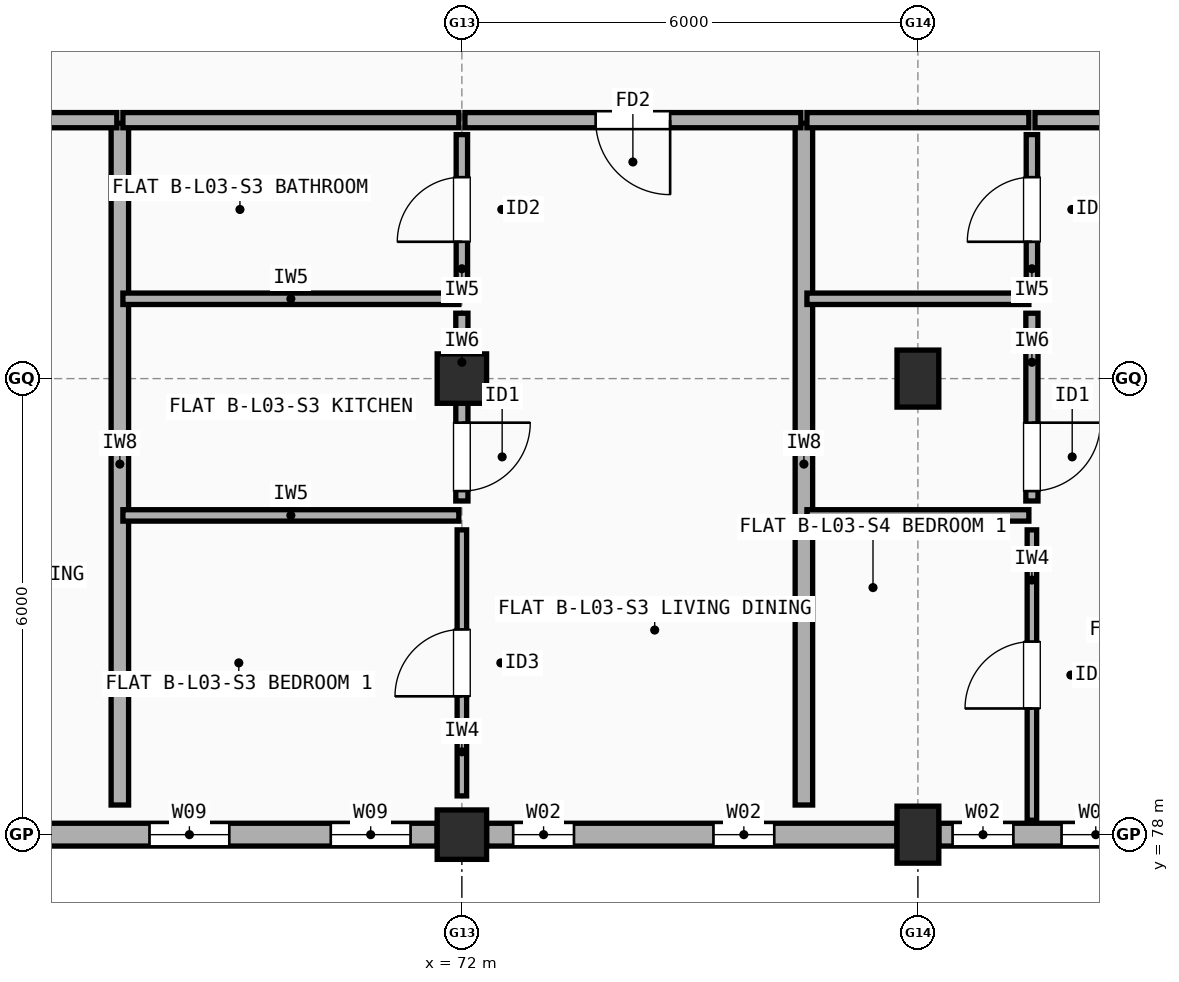
"""IFC4 building model, lengths in metres.
Left out: names, types, materials, properties, quantities, classifications, styles, units other than length and angle.
Written with IfcOpenShell. Run it as: python <this file> out.ifc"""

import sys

from ifc_helpers import new_model, si_unit, direction, frame, frame_2d, origin, origin_2d, place, context, subcontext, project, spatial, rectangle, extrude, element, fill, save


model = new_model("IFC4")
c1 = context("Model", 3, precision=1e-05, world=origin(), true_north=direction((0.0, 1.0)))
c2 = subcontext(c1, "Body", "Model", "MODEL_VIEW")
j1 = project(units=[si_unit("LENGTHUNIT", "METRE"), si_unit("PLANEANGLEUNIT", "RADIAN")], contexts=[c1])
p1 = place(None, origin())
s1 = spatial("IfcSite", under=j1, at=p1, CompositionType="ELEMENT")
p2 = place(p1, origin())
s2 = spatial("IfcBuilding", under=s1, at=p2, CompositionType="ELEMENT")
p3 = place(p2, frame((0.0, 0.0, 10.9)))
s3 = spatial("IfcBuildingStorey", under=s2, at=p3, CompositionType="ELEMENT", Elevation=10.9)
for number, where, z_axis, x_axis in (
    (1, (72.0, 78.0, 0.0), (0.0, 0.0, 1.0), (1.0, 0.0, 0.0)),
    (2, (72.0, 84.0, 0.0), (0.0, 0.0, 1.0), (1.0, 0.0, 0.0)),
):
    element("IfcColumn", number, at=place(p3, frame(where, z_axis=z_axis, x_axis=x_axis)), inside=s3, PredefinedType="COLUMN", context=c2, shape_type="SweptSolid", body=[
        extrude(rectangle(XDim=0.65, YDim=0.65, at=origin_2d()), origin(), (0.0, 0.0, 1.0), 2.96),
    ])
for number, where, z_axis, x_axis in (
    (3, (78.0, 78.0, 0.0), (0.0, 0.0, 1.0), (1.0, 0.0, 0.0)),
    (4, (78.0, 84.0, 0.0), (0.0, 0.0, 1.0), (1.0, 0.0, 0.0)),
):
    element("IfcColumn", number, at=place(p3, frame(where, z_axis=z_axis, x_axis=x_axis)), inside=s3, PredefinedType="COLUMN", context=c2, shape_type="SweptSolid", body=[
        extrude(rectangle(XDim=0.55, YDim=0.75, at=origin_2d()), origin(), (0.0, 0.0, 1.0), 2.96),
    ])
p4 = place(p3, frame((66.325, 78.0, 0.0), z_axis=(0.0, 0.0, 1.0), x_axis=(1.0, 0.0, 0.0)))
e5 = element("IfcWall", 5, at=p4, inside=s3, PredefinedType="STANDARD", context=c2, shape_type="SweptSolid", body=[
    extrude(rectangle(XDim=5.35, YDim=0.3, at=frame_2d((2.675, 0.0))), origin(), (0.0, 0.0, 1.0), 2.442),
])
p5 = place(p4, frame((1.565, 0.0, 0.9)))
e6 = element("IfcOpeningElement", 6, at=p5, cuts=e5, PredefinedType="OPENING", context=c2, shape_type="SweptSolid", body=[
    extrude(rectangle(XDim=1.05, YDim=1.35, at=frame_2d((0.525, 0.675))), frame((0.0, 0.16, 0.0), z_axis=(0.0, -1.0, 0.0), x_axis=(1.0, 0.0, 0.0)), (0.0, 0.0, 1.0), 0.32),
])
p6 = place(p4, frame((3.95, 0.0, 0.9)))
e7 = element("IfcOpeningElement", 7, at=p6, cuts=e5, PredefinedType="OPENING", context=c2, shape_type="SweptSolid", body=[
    extrude(rectangle(XDim=1.05, YDim=1.35, at=frame_2d((0.525, 0.675))), frame((0.0, 0.16, 0.0), z_axis=(0.0, -1.0, 0.0), x_axis=(1.0, 0.0, 0.0)), (0.0, 0.0, 1.0), 0.32),
])
p7 = place(p3, frame((72.325, 78.0, 0.0), z_axis=(0.0, 0.0, 1.0), x_axis=(1.0, 0.0, 0.0)))
e8 = element("IfcWall", 8, at=p7, inside=s3, PredefinedType="STANDARD", context=c2, shape_type="SweptSolid", body=[
    extrude(rectangle(XDim=5.4, YDim=0.3, at=frame_2d((2.7, 0.0))), origin(), (0.0, 0.0, 1.0), 2.442),
])
p8 = place(p7, frame((0.35, 0.0, 0.9)))
e9 = element("IfcOpeningElement", 9, at=p8, cuts=e8, PredefinedType="OPENING", context=c2, shape_type="SweptSolid", body=[
    extrude(rectangle(XDim=0.8, YDim=1.2, at=frame_2d((0.4, 0.6))), frame((0.0, 0.16, 0.0), z_axis=(0.0, -1.0, 0.0), x_axis=(1.0, 0.0, 0.0)), (0.0, 0.0, 1.0), 0.32),
])
p9 = place(p7, frame((2.985, 0.0, 0.9)))
e10 = element("IfcOpeningElement", 10, at=p9, cuts=e8, PredefinedType="OPENING", context=c2, shape_type="SweptSolid", body=[
    extrude(rectangle(XDim=0.8, YDim=1.2, at=frame_2d((0.4, 0.6))), frame((0.0, 0.16, 0.0), z_axis=(0.0, -1.0, 0.0), x_axis=(1.0, 0.0, 0.0)), (0.0, 0.0, 1.0), 0.32),
])
p10 = place(p3, frame((78.275, 78.0, 0.0), z_axis=(0.0, 0.0, 1.0), x_axis=(1.0, 0.0, 0.0)))
e11 = element("IfcWall", 11, at=p10, inside=s3, PredefinedType="STANDARD", context=c2, shape_type="SweptSolid", body=[
    extrude(rectangle(XDim=5.45, YDim=0.3, at=frame_2d((2.725, 0.0))), origin(), (0.0, 0.0, 1.0), 2.442),
])
p11 = place(p10, frame((1.615, 0.0, 0.9)))
e12 = element("IfcOpeningElement", 12, at=p11, cuts=e11, PredefinedType="OPENING", context=c2, shape_type="SweptSolid", body=[
    extrude(rectangle(XDim=0.9, YDim=1.3, at=frame_2d((0.45, 0.65))), frame((0.0, 0.16, 0.0), z_axis=(0.0, -1.0, 0.0), x_axis=(1.0, 0.0, 0.0)), (0.0, 0.0, 1.0), 0.32),
])
p12 = place(p10, frame((4.2, 0.0, 0.9)))
e13 = element("IfcOpeningElement", 13, at=p12, cuts=e11, PredefinedType="OPENING", context=c2, shape_type="SweptSolid", body=[
    extrude(rectangle(XDim=0.9, YDim=1.3, at=frame_2d((0.45, 0.65))), frame((0.0, 0.16, 0.0), z_axis=(0.0, -1.0, 0.0), x_axis=(1.0, 0.0, 0.0)), (0.0, 0.0, 1.0), 0.32),
])
p13 = place(p10, frame((0.181, 0.0, 0.9)))
e14 = element("IfcOpeningElement", 14, at=p13, cuts=e11, PredefinedType="OPENING", context=c2, shape_type="SweptSolid", body=[
    extrude(rectangle(XDim=0.8, YDim=1.2, at=frame_2d((0.4, 0.6))), frame((0.0, 0.16, 0.0), z_axis=(0.0, -1.0, 0.0), x_axis=(1.0, 0.0, 0.0)), (0.0, 0.0, 1.0), 0.32),
])
p14 = place(p3, frame((67.5, 78.39, 0.0), z_axis=(0.0, 0.0, 1.0), x_axis=(0.0, 1.0, 0.0)))
e15 = element("IfcWall", 15, at=p14, inside=s3, PredefinedType="SOLIDWALL", context=c2, shape_type="SweptSolid", body=[
    extrude(rectangle(XDim=8.97, YDim=0.23, at=frame_2d((4.485, 0.0))), origin(), (0.0, 0.0, 1.0), 2.442),
])
p15 = place(p3, frame((63.04, 87.4, 0.0), z_axis=(0.0, 0.0, 1.0), x_axis=(1.0, 0.0, 0.0)))
e16 = element("IfcWall", 16, at=p15, inside=s3, PredefinedType="SOLIDWALL", context=c2, shape_type="SweptSolid", body=[
    extrude(rectangle(XDim=4.42, YDim=0.2, at=frame_2d((2.21, 0.0))), origin(), (0.0, 0.0, 1.0), 2.548),
])
p16 = place(p15, frame((1.71, 0.0, 0.0)))
e17 = element("IfcOpeningElement", 17, at=p16, cuts=e16, PredefinedType="OPENING", context=c2, shape_type="SweptSolid", body=[
    extrude(rectangle(XDim=1.0, YDim=2.15, at=frame_2d((0.5, 1.075))), frame((0.0, 0.11, 0.0), z_axis=(0.0, -1.0, 0.0), x_axis=(1.0, 0.0, 0.0)), (0.0, 0.0, 1.0), 0.22),
])
p17 = place(p3, frame((76.5, 78.39, 0.0), z_axis=(0.0, 0.0, 1.0), x_axis=(0.0, 1.0, 0.0)))
e18 = element("IfcWall", 18, at=p17, inside=s3, PredefinedType="SOLIDWALL", context=c2, shape_type="SweptSolid", body=[
    extrude(rectangle(XDim=8.97, YDim=0.23, at=frame_2d((4.485, 0.0))), origin(), (0.0, 0.0, 1.0), 2.442),
])
p18 = place(p3, frame((67.54, 87.4, 0.0), z_axis=(0.0, 0.0, 1.0), x_axis=(1.0, 0.0, 0.0)))
e19 = element("IfcWall", 19, at=p18, inside=s3, PredefinedType="SOLIDWALL", context=c2, shape_type="SweptSolid", body=[
    extrude(rectangle(XDim=4.42, YDim=0.2, at=frame_2d((2.21, 0.0))), origin(), (0.0, 0.0, 1.0), 2.508),
])
p19 = place(p3, frame((72.04, 87.4, 0.0), z_axis=(0.0, 0.0, 1.0), x_axis=(1.0, 0.0, 0.0)))
e20 = element("IfcWall", 20, at=p19, inside=s3, PredefinedType="SOLIDWALL", context=c2, shape_type="SweptSolid", body=[
    extrude(rectangle(XDim=4.42, YDim=0.2, at=frame_2d((2.21, 0.0))), origin(), (0.0, 0.0, 1.0), 2.508),
])
p20 = place(p19, frame((1.72, 0.0, 0.0)))
e21 = element("IfcOpeningElement", 21, at=p20, cuts=e20, PredefinedType="OPENING", context=c2, shape_type="SweptSolid", body=[
    extrude(rectangle(XDim=0.98, YDim=2.15, at=frame_2d((0.49, 1.075))), frame((0.0, 0.11, 0.0), z_axis=(0.0, -1.0, 0.0), x_axis=(1.0, 0.0, 0.0)), (0.0, 0.0, 1.0), 0.22),
])
p21 = place(p3, frame((72.0, 78.51, 0.0), z_axis=(0.0, 0.0, 1.0), x_axis=(0.0, 1.0, 0.0)))
e22 = element("IfcWall", 22, at=p21, inside=s3, PredefinedType="PARTITIONING", context=c2, shape_type="SweptSolid", body=[
    extrude(rectangle(XDim=3.5, YDim=0.125, at=frame_2d((1.75, 0.0))), origin(), (0.0, 0.0, 1.0), 2.548),
])
p22 = place(p21, frame((1.31, 0.0, 0.0)))
e23 = element("IfcOpeningElement", 23, at=p22, cuts=e22, PredefinedType="OPENING", context=c2, shape_type="SweptSolid", body=[
    extrude(rectangle(XDim=0.88, YDim=2.1, at=frame_2d((0.44, 1.05))), frame((0.0, 0.073, 0.0), z_axis=(0.0, -1.0, 0.0), x_axis=(1.0, 0.0, 0.0)), (0.0, 0.0, 1.0), 0.145),
])
p23 = place(p3, frame((72.0, 82.39, 0.0), z_axis=(0.0, 0.0, 1.0), x_axis=(0.0, 1.0, 0.0)))
e24 = element("IfcWall", 24, at=p23, inside=s3, PredefinedType="PLUMBINGWALL", context=c2, shape_type="SweptSolid", body=[
    extrude(rectangle(XDim=2.47, YDim=0.16, at=frame_2d((1.235, 0.0))), origin(), (0.0, 0.0, 1.0), 2.508),
])
p24 = place(p23, frame((0.13, 0.0, 0.0)))
e25 = element("IfcOpeningElement", 25, at=p24, cuts=e24, PredefinedType="OPENING", context=c2, shape_type="SweptSolid", body=[
    extrude(rectangle(XDim=0.9, YDim=2.1, at=frame_2d((0.45, 1.05))), frame((0.0, 0.09, 0.0), z_axis=(0.0, -1.0, 0.0), x_axis=(1.0, 0.0, 0.0)), (0.0, 0.0, 1.0), 0.18),
])
p25 = place(p3, frame((72.0, 85.24, 0.0), z_axis=(0.0, 0.0, 1.0), x_axis=(0.0, 1.0, 0.0)))
e26 = element("IfcWall", 26, at=p25, inside=s3, PredefinedType="PARTITIONING", context=c2, shape_type="SweptSolid", body=[
    extrude(rectangle(XDim=1.97, YDim=0.15, at=frame_2d((0.985, 0.0))), origin(), (0.0, 0.0, 1.0), 2.508),
])
p26 = place(p25, frame((0.56, 0.0, 0.0)))
e27 = element("IfcOpeningElement", 27, at=p26, cuts=e26, PredefinedType="OPENING", context=c2, shape_type="SweptSolid", body=[
    extrude(rectangle(XDim=0.85, YDim=2.1, at=frame_2d((0.425, 1.05))), frame((0.0, 0.085, 0.0), z_axis=(0.0, -1.0, 0.0), x_axis=(1.0, 0.0, 0.0)), (0.0, 0.0, 1.0), 0.17),
])
p27 = place(p3, frame((67.54, 82.2, 0.0), z_axis=(0.0, 0.0, 1.0), x_axis=(1.0, 0.0, 0.0)))
e28 = element("IfcWall", 28, at=p27, inside=s3, PredefinedType="PARTITIONING", context=c2, shape_type="SweptSolid", body=[
    extrude(rectangle(XDim=4.42, YDim=0.15, at=frame_2d((2.21, 0.0))), origin(), (0.0, 0.0, 1.0), 2.548),
])
p28 = place(p3, frame((67.54, 85.05, 0.0), z_axis=(0.0, 0.0, 1.0), x_axis=(1.0, 0.0, 0.0)))
e29 = element("IfcWall", 29, at=p28, inside=s3, PredefinedType="PARTITIONING", context=c2, shape_type="SweptSolid", body=[
    extrude(rectangle(XDim=4.42, YDim=0.15, at=frame_2d((2.21, 0.0))), origin(), (0.0, 0.0, 1.0), 2.508),
])
p29 = place(p3, frame((76.54, 87.4, 0.0), z_axis=(0.0, 0.0, 1.0), x_axis=(1.0, 0.0, 0.0)))
e30 = element("IfcWall", 30, at=p29, inside=s3, PredefinedType="SOLIDWALL", context=c2, shape_type="SweptSolid", body=[
    extrude(rectangle(XDim=2.92, YDim=0.2, at=frame_2d((1.46, 0.0))), origin(), (0.0, 0.0, 1.0), 2.442),
])
p30 = place(p3, frame((79.54, 87.4, 0.0), z_axis=(0.0, 0.0, 1.0), x_axis=(1.0, 0.0, 0.0)))
e31 = element("IfcWall", 31, at=p30, inside=s3, PredefinedType="SOLIDWALL", context=c2, shape_type="SweptSolid", body=[
    extrude(rectangle(XDim=4.42, YDim=0.2, at=frame_2d((2.21, 0.0))), origin(), (0.0, 0.0, 1.0), 2.442),
])
p31 = place(p30, frame((1.685, 0.0, 0.0)))
e32 = element("IfcOpeningElement", 32, at=p31, cuts=e31, PredefinedType="OPENING", context=c2, shape_type="SweptSolid", body=[
    extrude(rectangle(XDim=1.05, YDim=2.15, at=frame_2d((0.525, 1.075))), frame((0.0, 0.11, 0.0), z_axis=(0.0, -1.0, 0.0), x_axis=(1.0, 0.0, 0.0)), (0.0, 0.0, 1.0), 0.22),
])
p32 = place(p3, frame((79.5, 78.19, 0.0), z_axis=(0.0, 0.0, 1.0), x_axis=(0.0, 1.0, 0.0)))
e33 = element("IfcWall", 33, at=p32, inside=s3, PredefinedType="PARTITIONING", context=c2, shape_type="SweptSolid", body=[
    extrude(rectangle(XDim=3.82, YDim=0.125, at=frame_2d((1.91, 0.0))), origin(), (0.0, 0.0, 1.0), 2.96),
])
p33 = place(p32, frame((1.47, 0.0, 0.0)))
e34 = element("IfcOpeningElement", 34, at=p33, cuts=e33, PredefinedType="OPENING", context=c2, shape_type="SweptSolid", body=[
    extrude(rectangle(XDim=0.88, YDim=2.1, at=frame_2d((0.44, 1.05))), frame((0.0, 0.073, 0.0), z_axis=(0.0, -1.0, 0.0), x_axis=(1.0, 0.0, 0.0)), (0.0, 0.0, 1.0), 0.145),
])
p34 = place(p3, frame((79.5, 82.39, 0.0), z_axis=(0.0, 0.0, 1.0), x_axis=(0.0, 1.0, 0.0)))
e35 = element("IfcWall", 35, at=p34, inside=s3, PredefinedType="PLUMBINGWALL", context=c2, shape_type="SweptSolid", body=[
    extrude(rectangle(XDim=2.47, YDim=0.16, at=frame_2d((1.235, 0.0))), origin(), (0.0, 0.0, 1.0), 2.442),
])
p35 = place(p34, frame((0.13, 0.0, 0.0)))
e36 = element("IfcOpeningElement", 36, at=p35, cuts=e35, PredefinedType="OPENING", context=c2, shape_type="SweptSolid", body=[
    extrude(rectangle(XDim=0.9, YDim=2.1, at=frame_2d((0.45, 1.05))), frame((0.0, 0.09, 0.0), z_axis=(0.0, -1.0, 0.0), x_axis=(1.0, 0.0, 0.0)), (0.0, 0.0, 1.0), 0.18),
])
p36 = place(p3, frame((79.5, 85.24, 0.0), z_axis=(0.0, 0.0, 1.0), x_axis=(0.0, 1.0, 0.0)))
e37 = element("IfcWall", 37, at=p36, inside=s3, PredefinedType="PARTITIONING", context=c2, shape_type="SweptSolid", body=[
    extrude(rectangle(XDim=1.97, YDim=0.15, at=frame_2d((0.985, 0.0))), origin(), (0.0, 0.0, 1.0), 2.96),
])
p37 = place(p36, frame((0.56, 0.0, 0.0)))
e38 = element("IfcOpeningElement", 38, at=p37, cuts=e37, PredefinedType="OPENING", context=c2, shape_type="SweptSolid", body=[
    extrude(rectangle(XDim=0.85, YDim=2.1, at=frame_2d((0.425, 1.05))), frame((0.0, 0.085, 0.0), z_axis=(0.0, -1.0, 0.0), x_axis=(1.0, 0.0, 0.0)), (0.0, 0.0, 1.0), 0.17),
])
for number, where, z_axis, x_axis in (
    (39, (76.54, 82.2, 0.0), (0.0, 0.0, 1.0), (1.0, 0.0, 0.0)),
    (40, (76.54, 85.05, 0.0), (0.0, 0.0, 1.0), (1.0, 0.0, 0.0)),
):
    element("IfcWall", number, at=place(p3, frame(where, z_axis=z_axis, x_axis=x_axis)), inside=s3, PredefinedType="PARTITIONING", context=c2, shape_type="SweptSolid", body=[
        extrude(rectangle(XDim=2.92, YDim=0.15, at=frame_2d((1.46, 0.0))), origin(), (0.0, 0.0, 1.0), 2.442),
    ])
p38 = place(p5, origin())
e41 = element("IfcWindow", 41, at=p38, inside=s3, PartitioningType="SINGLE_PANEL", PredefinedType="WINDOW", context=c2, shape_type="SweptSolid", body=[
    extrude(rectangle(XDim=1.05, YDim=1.35, at=frame_2d((0.525, 0.675))), frame((0.0, 0.03, 0.0), z_axis=(0.0, -1.0, 0.0), x_axis=(1.0, 0.0, 0.0)), (0.0, 0.0, 1.0), 0.06),
])
fill(e6, e41)
p39 = place(p6, origin())
e42 = element("IfcWindow", 42, at=p39, inside=s3, PartitioningType="SINGLE_PANEL", PredefinedType="WINDOW", context=c2, shape_type="SweptSolid", body=[
    extrude(rectangle(XDim=1.05, YDim=1.35, at=frame_2d((0.525, 0.675))), frame((0.0, 0.03, 0.0), z_axis=(0.0, -1.0, 0.0), x_axis=(1.0, 0.0, 0.0)), (0.0, 0.0, 1.0), 0.06),
])
fill(e7, e42)
p40 = place(p8, origin())
e43 = element("IfcWindow", 43, at=p40, inside=s3, PartitioningType="SINGLE_PANEL", PredefinedType="WINDOW", context=c2, shape_type="SweptSolid", body=[
    extrude(rectangle(XDim=0.8, YDim=1.2, at=frame_2d((0.4, 0.6))), frame((0.0, 0.03, 0.0), z_axis=(0.0, -1.0, 0.0), x_axis=(1.0, 0.0, 0.0)), (0.0, 0.0, 1.0), 0.06),
])
fill(e9, e43)
p41 = place(p9, origin())
e44 = element("IfcWindow", 44, at=p41, inside=s3, PartitioningType="SINGLE_PANEL", PredefinedType="WINDOW", context=c2, shape_type="SweptSolid", body=[
    extrude(rectangle(XDim=0.8, YDim=1.2, at=frame_2d((0.4, 0.6))), frame((0.0, 0.03, 0.0), z_axis=(0.0, -1.0, 0.0), x_axis=(1.0, 0.0, 0.0)), (0.0, 0.0, 1.0), 0.06),
])
fill(e10, e44)
p42 = place(p11, origin())
e45 = element("IfcWindow", 45, at=p42, inside=s3, PartitioningType="SINGLE_PANEL", PredefinedType="WINDOW", context=c2, shape_type="SweptSolid", body=[
    extrude(rectangle(XDim=0.9, YDim=1.3, at=frame_2d((0.45, 0.65))), frame((0.0, 0.03, 0.0), z_axis=(0.0, -1.0, 0.0), x_axis=(1.0, 0.0, 0.0)), (0.0, 0.0, 1.0), 0.06),
])
fill(e12, e45)
p43 = place(p13, origin())
e46 = element("IfcWindow", 46, at=p43, inside=s3, PartitioningType="SINGLE_PANEL", PredefinedType="WINDOW", context=c2, shape_type="SweptSolid", body=[
    extrude(rectangle(XDim=0.8, YDim=1.2, at=frame_2d((0.4, 0.6))), frame((0.0, 0.03, 0.0), z_axis=(0.0, -1.0, 0.0), x_axis=(1.0, 0.0, 0.0)), (0.0, 0.0, 1.0), 0.06),
])
fill(e14, e46)
p44 = place(p20, origin())
e47 = element("IfcDoor", 47, at=p44, inside=s3, OperationType="SINGLE_SWING_RIGHT", PredefinedType="DOOR", context=c2, shape_type="SweptSolid", body=[
    extrude(rectangle(XDim=0.98, YDim=2.15, at=frame_2d((0.49, 1.075))), frame((0.0, 0.025, 0.0), z_axis=(0.0, -1.0, 0.0), x_axis=(1.0, 0.0, 0.0)), (0.0, 0.0, 1.0), 0.05),
])
fill(e21, e47)
p45 = place(p22, origin())
e48 = element("IfcDoor", 48, at=p45, inside=s3, OperationType="SINGLE_SWING_LEFT", PredefinedType="DOOR", context=c2, shape_type="SweptSolid", body=[
    extrude(rectangle(XDim=0.88, YDim=2.1, at=frame_2d((0.44, 1.05))), frame((0.0, 0.025, 0.0), z_axis=(0.0, -1.0, 0.0), x_axis=(1.0, 0.0, 0.0)), (0.0, 0.0, 1.0), 0.05),
])
fill(e23, e48)
p46 = place(p24, origin())
e49 = element("IfcDoor", 49, at=p46, inside=s3, OperationType="SINGLE_SWING_RIGHT", PredefinedType="DOOR", context=c2, shape_type="SweptSolid", body=[
    extrude(rectangle(XDim=0.9, YDim=2.1, at=frame_2d((0.45, 1.05))), frame((0.0, 0.025, 0.0), z_axis=(0.0, -1.0, 0.0), x_axis=(1.0, 0.0, 0.0)), (0.0, 0.0, 1.0), 0.05),
])
fill(e25, e49)
p47 = place(p26, origin())
e50 = element("IfcDoor", 50, at=p47, inside=s3, OperationType="SINGLE_SWING_LEFT", PredefinedType="DOOR", context=c2, shape_type="SweptSolid", body=[
    extrude(rectangle(XDim=0.85, YDim=2.1, at=frame_2d((0.425, 1.05))), frame((0.0, 0.025, 0.0), z_axis=(0.0, -1.0, 0.0), x_axis=(1.0, 0.0, 0.0)), (0.0, 0.0, 1.0), 0.05),
])
fill(e27, e50)
p48 = place(p33, origin())
e51 = element("IfcDoor", 51, at=p48, inside=s3, OperationType="SINGLE_SWING_LEFT", PredefinedType="DOOR", context=c2, shape_type="SweptSolid", body=[
    extrude(rectangle(XDim=0.88, YDim=2.1, at=frame_2d((0.44, 1.05))), frame((0.0, 0.025, 0.0), z_axis=(0.0, -1.0, 0.0), x_axis=(1.0, 0.0, 0.0)), (0.0, 0.0, 1.0), 0.05),
])
fill(e34, e51)
p49 = place(p35, origin())
e52 = element("IfcDoor", 52, at=p49, inside=s3, OperationType="SINGLE_SWING_RIGHT", PredefinedType="DOOR", context=c2, shape_type="SweptSolid", body=[
    extrude(rectangle(XDim=0.9, YDim=2.1, at=frame_2d((0.45, 1.05))), frame((0.0, 0.025, 0.0), z_axis=(0.0, -1.0, 0.0), x_axis=(1.0, 0.0, 0.0)), (0.0, 0.0, 1.0), 0.05),
])
fill(e36, e52)
p50 = place(p37, origin())
e53 = element("IfcDoor", 53, at=p50, inside=s3, OperationType="SINGLE_SWING_LEFT", PredefinedType="DOOR", context=c2, shape_type="SweptSolid", body=[
    extrude(rectangle(XDim=0.85, YDim=2.1, at=frame_2d((0.425, 1.05))), frame((0.0, 0.025, 0.0), z_axis=(0.0, -1.0, 0.0), x_axis=(1.0, 0.0, 0.0)), (0.0, 0.0, 1.0), 0.05),
])
fill(e38, e53)
save(model, sys.argv[1])
